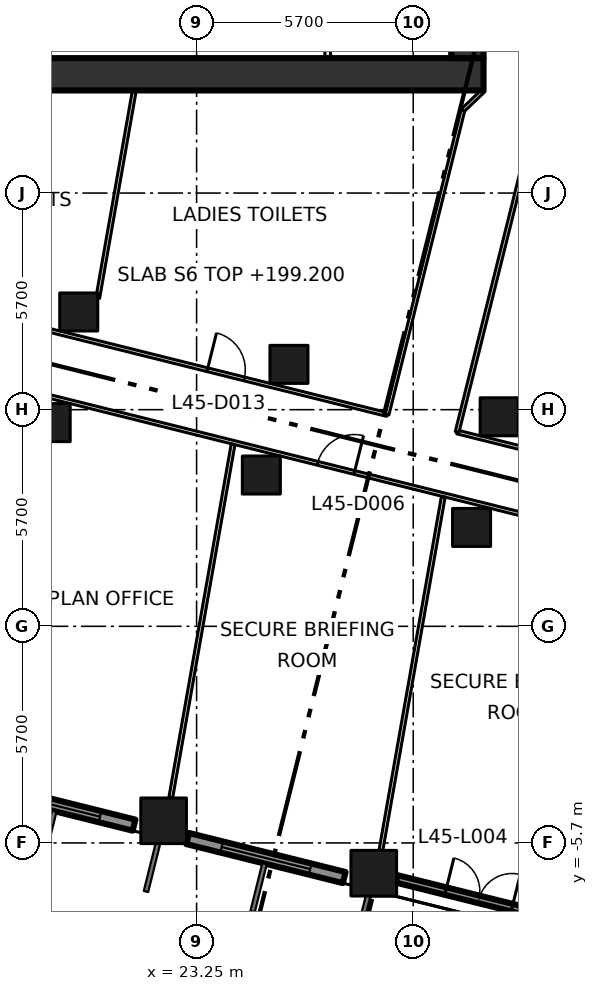
"""IFC4 building model, lengths in metres.
Left out: names, types, materials, properties, quantities, classifications, styles, units other than length and angle.
Written with IfcOpenShell. Run it as: python <this file> out.ifc"""

import sys

from ifc_helpers import new_model, si_unit, direction, frame, frame_2d, origin, origin_2d, place, context, subcontext, project, spatial, rectangle, extrude, element, fill, save


model = new_model("IFC4")
c1 = context("Model", 3, precision=1e-05, world=origin(), true_north=direction((0.0, 1.0)))
c2 = subcontext(c1, "Body", "Model", "MODEL_VIEW")
j1 = project(units=[si_unit("LENGTHUNIT", "METRE"), si_unit("PLANEANGLEUNIT", "RADIAN")], contexts=[c1])
p1 = place(None, origin())
s1 = spatial("IfcSite", under=j1, at=p1, CompositionType="ELEMENT")
p2 = place(p1, origin())
s2 = spatial("IfcBuilding", under=s1, at=p2, CompositionType="ELEMENT")
p3 = place(p2, frame((0.0, 0.0, 199.2)))
s3 = spatial("IfcBuildingStorey", under=s2, at=p3, CompositionType="ELEMENT", Elevation=199.2)
for number, where, z_axis, x_axis in (
    (1, (22.382, -5.117, 0.0), (0.0, 0.0, 1.0), (1.0, 0.0, 0.0)),
    (2, (27.912, -6.496, 0.0), (0.0, 0.0, 1.0), (1.0, 0.0, 0.0)),
):
    element("IfcColumn", number, at=place(p3, frame(where, z_axis=z_axis, x_axis=x_axis)), inside=s3, PredefinedType="COLUMN", context=c2, shape_type="SweptSolid", body=[
        extrude(rectangle(XDim=1.2, YDim=1.2, at=origin_2d()), origin(), (0.0, 0.0, 1.0), 4.2),
    ])
for number, where, z_axis, x_axis in (
    (3, (19.424, 5.36, 0.0), (0.0, 0.0, 1.0), (1.0, 0.0, 0.0)),
    (4, (24.954, 3.981, 0.0), (0.0, 0.0, 1.0), (1.0, 0.0, 0.0)),
    (5, (30.485, 2.602, 0.0), (0.0, 0.0, 1.0), (1.0, 0.0, 0.0)),
    (6, (20.149, 8.271, 0.0), (0.0, 0.0, 1.0), (1.0, 0.0, 0.0)),
    (7, (25.68, 6.892, 0.0), (0.0, 0.0, 1.0), (1.0, 0.0, 0.0)),
    (8, (31.211, 5.513, 0.0), (0.0, 0.0, 1.0), (1.0, 0.0, 0.0)),
):
    element("IfcColumn", number, at=place(p3, frame(where, z_axis=z_axis, x_axis=x_axis)), inside=s3, PredefinedType="COLUMN", context=c2, shape_type="SweptSolid", body=[
        extrude(rectangle(XDim=1.0, YDim=1.0, at=origin_2d()), origin(), (0.0, 0.0, 1.0), 4.2),
    ])
p4 = place(p3, frame((8.0, 14.525, -0.3), z_axis=(0.0, 0.0, 1.0), x_axis=(1.0, 0.0, 0.0)))
e9 = element("IfcWall", 9, at=p4, inside=s3, PredefinedType="SHEAR", context=c2, shape_type="SweptSolid", body=[
    extrude(rectangle(XDim=22.8, YDim=0.85, at=frame_2d((11.4, 0.0))), origin(), (0.0, 0.0, 1.0), 4.2),
])
p5 = place(p4, frame((2.3, 0.0, 0.3)))
e10 = element("IfcOpeningElement", 10, at=p5, cuts=e9, PredefinedType="OPENING", context=c2, shape_type="SweptSolid", body=[
    extrude(rectangle(XDim=1.8, YDim=2.1, at=frame_2d((0.9, 1.05))), frame((0.0, 0.435, 0.0), z_axis=(0.0, -1.0, 0.0), x_axis=(1.0, 0.0, 0.0)), (0.0, 0.0, 1.0), 0.87),
])
p6 = place(p3, frame((30.375, 14.95, -0.3), z_axis=(0.0, 0.0, 1.0), x_axis=(0.0, 1.0, 0.0)))
e11 = element("IfcWall", 11, at=p6, inside=s3, PredefinedType="SHEAR", context=c2, shape_type="SweptSolid", body=[
    extrude(rectangle(XDim=20.75, YDim=0.85, at=frame_2d((10.375, 0.0))), origin(), (0.0, 0.0, 1.0), 4.2),
])
p7 = place(p3, frame((26.7, 14.95, 0.0), z_axis=(0.0, 0.0, 1.0), x_axis=(0.0, 1.0, 0.0)))
e12 = element("IfcWall", 12, at=p7, inside=s3, PredefinedType="PARTITIONING", context=c2, shape_type="SweptSolid", body=[
    extrude(rectangle(XDim=2.675, YDim=0.15, at=frame_2d((1.337, 0.0))), origin(), (0.0, 0.0, 1.0), 3.9),
])
p8 = place(p3, frame((17.484, -4.205, 0.0), z_axis=(0.0, 0.0, 1.0), x_axis=(0.970318118028, -0.241832069473, 0.0)))
e13 = element("IfcWall", 13, at=p8, inside=s3, PredefinedType="SOLIDWALL", context=c2, shape_type="SweptSolid", body=[
    extrude(rectangle(XDim=4.246, YDim=0.3, at=frame_2d((2.123, 0.0))), origin(), (0.0, 0.0, 1.0), 3.15),
])
p9 = place(p8, frame((0.923, 0.0, 0.8)))
e14 = element("IfcOpeningElement", 14, at=p9, cuts=e13, PredefinedType="OPENING", context=c2, shape_type="SweptSolid", body=[
    extrude(rectangle(XDim=2.4, YDim=2.1, at=frame_2d((1.2, 1.05))), frame((0.0, 0.16, 0.0), z_axis=(0.0, -1.0, 0.0), x_axis=(1.0, 0.0, 0.0)), (0.0, 0.0, 1.0), 0.32),
])
p10 = place(p3, frame((23.015, -5.584, 0.0), z_axis=(0.0, 0.0, 1.0), x_axis=(0.970291164166, -0.241940192487, 0.0)))
e15 = element("IfcWall", 15, at=p10, inside=s3, PredefinedType="SOLIDWALL", context=c2, shape_type="SweptSolid", body=[
    extrude(rectangle(XDim=4.245, YDim=0.3, at=frame_2d((2.123, 0.0))), origin(), (0.0, 0.0, 1.0), 3.15),
])
p11 = place(p10, frame((0.922, 0.0, 0.8)))
e16 = element("IfcOpeningElement", 16, at=p11, cuts=e15, PredefinedType="OPENING", context=c2, shape_type="SweptSolid", body=[
    extrude(rectangle(XDim=2.4, YDim=2.1, at=frame_2d((1.2, 1.05))), frame((0.0, 0.16, 0.0), z_axis=(0.0, -1.0, 0.0), x_axis=(1.0, 0.0, 0.0)), (0.0, 0.0, 1.0), 0.32),
])
p12 = place(p3, frame((28.512, -6.645, 0.0), z_axis=(0.0, 0.0, 1.0), x_axis=(0.970283897632, -0.241969332758, 0.0)))
e17 = element("IfcWall", 17, at=p12, inside=s3, PredefinedType="SOLIDWALL", context=c2, shape_type="SweptSolid", body=[
    extrude(rectangle(XDim=4.464, YDim=0.2, at=frame_2d((2.232, 0.0))), origin(), (0.0, 0.0, 1.0), 3.15),
])
p13 = place(p12, frame((1.331, 0.0, 0.0)))
e18 = element("IfcOpeningElement", 18, at=p13, cuts=e17, PredefinedType="OPENING", context=c2, shape_type="SweptSolid", body=[
    extrude(rectangle(XDim=1.8, YDim=2.9, at=frame_2d((0.9, 1.45))), frame((0.0, 0.11, 0.0), z_axis=(0.0, -1.0, 0.0), x_axis=(1.0, 0.0, 0.0)), (0.0, 0.0, 1.0), 0.22),
])
p14 = place(p3, frame((8.565, 8.744, 0.0), z_axis=(0.0, 0.0, 1.0), x_axis=(0.970297321886, -0.241915495869, 0.0)))
e19 = element("IfcWall", 19, at=p14, inside=s3, PredefinedType="PARTITIONING", context=c2, shape_type="SweptSolid", body=[
    extrude(rectangle(XDim=56.974, YDim=0.1, at=frame_2d((28.487, 0.0))), origin(), (0.0, 0.0, 1.0), 3.9),
])
p15 = place(p14, frame((36.514, 0.0, 0.0)))
e20 = element("IfcOpeningElement", 20, at=p15, cuts=e19, PredefinedType="OPENING", context=c2, shape_type="SweptSolid", body=[
    extrude(rectangle(XDim=1.8, YDim=2.1, at=frame_2d((0.9, 1.05))), frame((0.0, 0.06, 0.0), z_axis=(0.0, -1.0, 0.0), x_axis=(1.0, 0.0, 0.0)), (0.0, 0.0, 1.0), 0.12),
])
p16 = place(p14, frame((41.914, 0.0, 0.0)))
e21 = element("IfcOpeningElement", 21, at=p16, cuts=e19, PredefinedType="OPENING", context=c2, shape_type="SweptSolid", body=[
    extrude(rectangle(XDim=1.0, YDim=2.1, at=frame_2d((0.5, 1.05))), frame((0.0, 0.06, 0.0), z_axis=(0.0, -1.0, 0.0), x_axis=(1.0, 0.0, 0.0)), (0.0, 0.0, 1.0), 0.12),
])
p17 = place(p14, frame((53.113, 0.0, 0.0)))
e22 = element("IfcOpeningElement", 22, at=p17, cuts=e19, PredefinedType="OPENING", context=c2, shape_type="SweptSolid", body=[
    extrude(rectangle(XDim=1.0, YDim=2.1, at=frame_2d((0.5, 1.05))), frame((0.0, 0.06, 0.0), z_axis=(0.0, -1.0, 0.0), x_axis=(1.0, 0.0, 0.0)), (0.0, 0.0, 1.0), 0.12),
])
p18 = place(p14, frame((18.413, 0.0, 0.0)))
e23 = element("IfcOpeningElement", 23, at=p18, cuts=e19, PredefinedType="OPENING", context=c2, shape_type="SweptSolid", body=[
    extrude(rectangle(XDim=1.0, YDim=2.1, at=frame_2d((0.5, 1.05))), frame((0.0, 0.06, 0.0), z_axis=(0.0, -1.0, 0.0), x_axis=(1.0, 0.0, 0.0)), (0.0, 0.0, 1.0), 0.12),
])
p19 = place(p14, frame((24.114, 0.0, 0.0)))
e24 = element("IfcOpeningElement", 24, at=p19, cuts=e19, PredefinedType="OPENING", context=c2, shape_type="SweptSolid", body=[
    extrude(rectangle(XDim=1.0, YDim=2.1, at=frame_2d((0.5, 1.05))), frame((0.0, 0.06, 0.0), z_axis=(0.0, -1.0, 0.0), x_axis=(1.0, 0.0, 0.0)), (0.0, 0.0, 1.0), 0.12),
])
p20 = place(p14, frame((7.18, 0.0, 0.0)))
e25 = element("IfcOpeningElement", 25, at=p20, cuts=e19, PredefinedType="OPENING", context=c2, shape_type="SweptSolid", body=[
    extrude(rectangle(XDim=1.8, YDim=2.1, at=frame_2d((0.9, 1.05))), frame((0.0, 0.06, 0.0), z_axis=(0.0, -1.0, 0.0), x_axis=(1.0, 0.0, 0.0)), (0.0, 0.0, 1.0), 0.12),
])
p21 = place(p3, frame((8.973, 10.382, 0.0), z_axis=(0.0, 0.0, 1.0), x_axis=(0.970286808807, -0.241957658808, 0.0)))
e26 = element("IfcWall", 26, at=p21, inside=s3, PredefinedType="PARTITIONING", context=c2, shape_type="SweptSolid", body=[
    extrude(rectangle(XDim=19.88, YDim=0.1, at=frame_2d((9.94, 0.0))), origin(), (0.0, 0.0, 1.0), 3.9),
])
p22 = place(p21, frame((15.006, 0.0, 0.0)))
e27 = element("IfcOpeningElement", 27, at=p22, cuts=e26, PredefinedType="OPENING", context=c2, shape_type="SweptSolid", body=[
    extrude(rectangle(XDim=1.0, YDim=2.1, at=frame_2d((0.5, 1.05))), frame((0.0, 0.06, 0.0), z_axis=(0.0, -1.0, 0.0), x_axis=(1.0, 0.0, 0.0)), (0.0, 0.0, 1.0), 0.12),
])
p23 = place(p3, frame((30.105, 5.113, 0.0), z_axis=(0.0, 0.0, 1.0), x_axis=(0.970293689353, -0.241930065106, 0.0)))
e28 = element("IfcWall", 28, at=p23, inside=s3, PredefinedType="PARTITIONING", context=c2, shape_type="SweptSolid", body=[
    extrude(rectangle(XDim=35.197, YDim=0.1, at=frame_2d((17.598, 0.0))), origin(), (0.0, 0.0, 1.0), 3.9),
])
p24 = place(p23, frame((26.527, 0.0, 0.0)))
e29 = element("IfcOpeningElement", 29, at=p24, cuts=e28, PredefinedType="OPENING", context=c2, shape_type="SweptSolid", body=[
    extrude(rectangle(XDim=1.0, YDim=2.1, at=frame_2d((0.5, 1.05))), frame((0.0, 0.06, 0.0), z_axis=(0.0, -1.0, 0.0), x_axis=(1.0, 0.0, 0.0)), (0.0, 0.0, 1.0), 0.12),
])
p25 = place(p23, frame((2.98, 0.0, 0.0)))
e30 = element("IfcOpeningElement", 30, at=p25, cuts=e28, PredefinedType="OPENING", context=c2, shape_type="SweptSolid", body=[
    extrude(rectangle(XDim=1.0, YDim=2.1, at=frame_2d((0.5, 1.05))), frame((0.0, 0.06, 0.0), z_axis=(0.0, -1.0, 0.0), x_axis=(1.0, 0.0, 0.0)), (0.0, 0.0, 1.0), 0.12),
])
p26 = place(p23, frame((19.227, 0.0, 0.0)))
e31 = element("IfcOpeningElement", 31, at=p26, cuts=e28, PredefinedType="OPENING", context=c2, shape_type="SweptSolid", body=[
    extrude(rectangle(XDim=1.8, YDim=2.1, at=frame_2d((0.9, 1.05))), frame((0.0, 0.06, 0.0), z_axis=(0.0, -1.0, 0.0), x_axis=(1.0, 0.0, 0.0)), (0.0, 0.0, 1.0), 0.12),
])
p27 = place(p3, frame((30.105, 5.113, 0.0), z_axis=(0.0, 0.0, 1.0), x_axis=(0.241984285369, 0.970280168629, 0.0)))
e32 = element("IfcWall", 32, at=p27, inside=s3, PredefinedType="PARTITIONING", context=c2, shape_type="SweptSolid", body=[
    extrude(rectangle(XDim=8.232, YDim=0.1, at=frame_2d((4.116, 0.0))), origin(), (0.0, 0.0, 1.0), 3.9),
])
p28 = place(p3, frame((30.259, 13.583, 0.0), z_axis=(0.0, 0.0, 1.0), x_axis=(-0.241888494143, -0.970304053584, 0.0)))
e33 = element("IfcWall", 33, at=p28, inside=s3, PredefinedType="PARTITIONING", context=c2, shape_type="SweptSolid", body=[
    extrude(rectangle(XDim=8.256, YDim=0.1, at=frame_2d((4.128, 0.0))), origin(), (0.0, 0.0, 1.0), 3.9),
])
p29 = place(p3, frame((30.8, 14.1, 0.0), z_axis=(0.0, 0.0, 1.0), x_axis=(-0.722911025189, -0.690941133281, 0.0)))
e34 = element("IfcWall", 34, at=p29, inside=s3, PredefinedType="PARTITIONING", context=c2, shape_type="SweptSolid", body=[
    extrude(rectangle(XDim=0.748, YDim=0.1, at=frame_2d((0.374, 0.0))), origin(), (0.0, 0.0, 1.0), 3.9),
])
p30 = place(p3, frame((20.649, 8.637, 0.0), z_axis=(0.0, 0.0, 1.0), x_axis=(0.173619629197, 0.984812786451, 0.0)))
e35 = element("IfcWall", 35, at=p30, inside=s3, PredefinedType="PARTITIONING", context=c2, shape_type="SweptSolid", body=[
    extrude(rectangle(XDim=5.547, YDim=0.1, at=frame_2d((2.774, 0.0))), origin(), (0.0, 0.0, 1.0), 3.9),
])
p31 = place(p3, frame((22.569, -4.517, 0.0), z_axis=(0.0, 0.0, 1.0), x_axis=(0.173660042162, 0.984805660908, 0.0)))
e36 = element("IfcWall", 36, at=p31, inside=s3, PredefinedType="PARTITIONING", context=c2, shape_type="SweptSolid", body=[
    extrude(rectangle(XDim=9.449, YDim=0.1, at=frame_2d((4.724, 0.0))), origin(), (0.0, 0.0, 1.0), 3.9),
])
p32 = place(p3, frame((28.1, -5.896, 0.0), z_axis=(0.0, 0.0, 1.0), x_axis=(0.173664461196, 0.984804881648, 0.0)))
e37 = element("IfcWall", 37, at=p32, inside=s3, PredefinedType="PARTITIONING", context=c2, shape_type="SweptSolid", body=[
    extrude(rectangle(XDim=9.448, YDim=0.1, at=frame_2d((4.724, 0.0))), origin(), (0.0, 0.0, 1.0), 3.9),
])
p33 = place(p9, origin())
e38 = element("IfcWindow", 38, at=p33, inside=s3, PartitioningType="DOUBLE_PANEL_VERTICAL", PredefinedType="WINDOW", context=c2, shape_type="SweptSolid", body=[
    extrude(rectangle(XDim=2.4, YDim=2.1, at=frame_2d((1.2, 1.05))), frame((0.0, 0.03, 0.0), z_axis=(0.0, -1.0, 0.0), x_axis=(1.0, 0.0, 0.0)), (0.0, 0.0, 1.0), 0.06),
])
fill(e14, e38)
p34 = place(p11, origin())
e39 = element("IfcWindow", 39, at=p34, inside=s3, PartitioningType="DOUBLE_PANEL_VERTICAL", PredefinedType="WINDOW", context=c2, shape_type="SweptSolid", body=[
    extrude(rectangle(XDim=2.4, YDim=2.1, at=frame_2d((1.2, 1.05))), frame((0.0, 0.03, 0.0), z_axis=(0.0, -1.0, 0.0), x_axis=(1.0, 0.0, 0.0)), (0.0, 0.0, 1.0), 0.06),
])
fill(e16, e39)
p35 = place(p13, origin())
e40 = element("IfcDoor", 40, at=p35, inside=s3, OperationType="DOUBLE_DOOR_SINGLE_SWING", PredefinedType="DOOR", context=c2, shape_type="SweptSolid", body=[
    extrude(rectangle(XDim=1.8, YDim=2.9, at=frame_2d((0.9, 1.45))), frame((0.0, 0.025, 0.0), z_axis=(0.0, -1.0, 0.0), x_axis=(1.0, 0.0, 0.0)), (0.0, 0.0, 1.0), 0.05),
])
fill(e18, e40)
p36 = place(p18, origin())
e41 = element("IfcDoor", 41, at=p36, inside=s3, OperationType="SINGLE_SWING_RIGHT", PredefinedType="DOOR", context=c2, shape_type="SweptSolid", body=[
    extrude(rectangle(XDim=1.0, YDim=2.1, at=frame_2d((0.5, 1.05))), frame((0.0, 0.025, 0.0), z_axis=(0.0, -1.0, 0.0), x_axis=(1.0, 0.0, 0.0)), (0.0, 0.0, 1.0), 0.05),
])
fill(e23, e41)
p37 = place(p22, origin())
e42 = element("IfcDoor", 42, at=p37, inside=s3, OperationType="SINGLE_SWING_LEFT", PredefinedType="DOOR", context=c2, shape_type="SweptSolid", body=[
    extrude(rectangle(XDim=1.0, YDim=2.1, at=frame_2d((0.5, 1.05))), frame((0.0, 0.025, 0.0), z_axis=(0.0, -1.0, 0.0), x_axis=(1.0, 0.0, 0.0)), (0.0, 0.0, 1.0), 0.05),
])
fill(e27, e42)
save(model, sys.argv[1])
